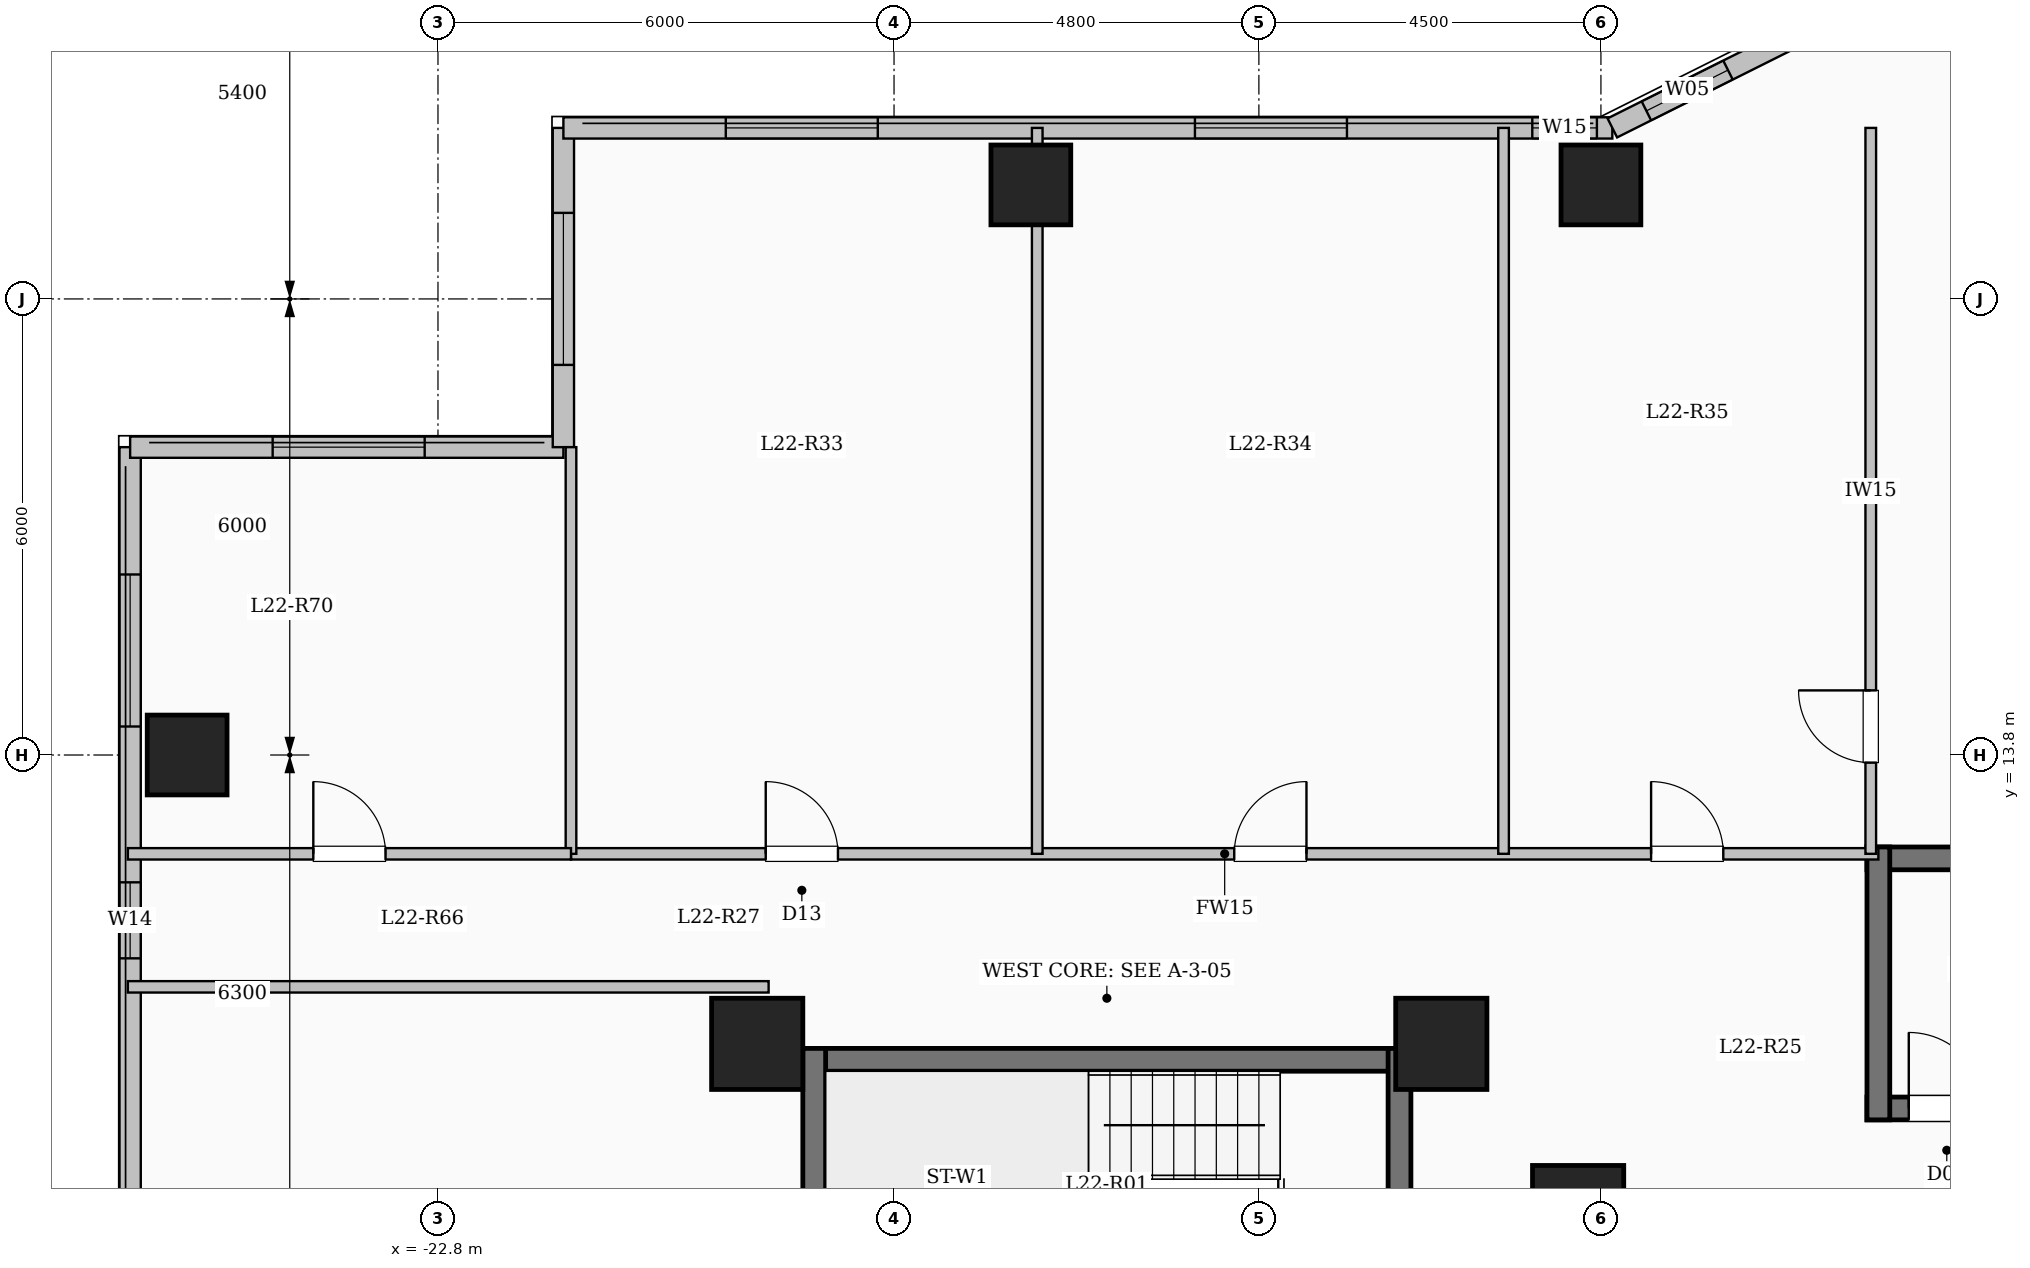
"""IFC4 building model, lengths in metres.
Left out: names, types, materials, properties, quantities, classifications, styles, units other than length and angle.
Written with IfcOpenShell. Run it as: python <this file> out.ifc"""

import sys

from ifc_helpers import new_model, si_unit, direction, frame, frame_2d, origin, origin_2d, place, context, subcontext, project, spatial, rectangle, extrude, element, fill, save


model = new_model("IFC4")
c1 = context("Model", 3, precision=1e-05, world=origin(), true_north=direction((0.0, 1.0)))
c2 = subcontext(c1, "Body", "Model", "MODEL_VIEW")
j1 = project(units=[si_unit("LENGTHUNIT", "METRE"), si_unit("PLANEANGLEUNIT", "RADIAN")], contexts=[c1])
p1 = place(None, origin())
s1 = spatial("IfcSite", under=j1, at=p1, CompositionType="ELEMENT")
p2 = place(p1, origin())
s2 = spatial("IfcBuilding", under=s1, at=p2, CompositionType="ELEMENT")
p3 = place(p2, frame((0.0, 0.0, 85.0)))
s3 = spatial("IfcBuildingStorey", under=s2, at=p3, CompositionType="ELEMENT", Elevation=85.0)
for number, where, z_axis, x_axis in (
    (1, (-7.8, 7.8, 0.0), (0.0, 0.0, 1.0), (1.0, 0.0, 0.0)),
    (2, (-9.6, 10.0, 0.0), (0.0, 0.0, 1.0), (1.0, 0.0, 0.0)),
    (3, (-18.6, 10.0, 0.0), (0.0, 0.0, 1.0), (1.0, 0.0, 0.0)),
):
    element("IfcColumn", number, at=place(p3, frame(where, z_axis=z_axis, x_axis=x_axis)), inside=s3, PredefinedType="COLUMN", context=c2, shape_type="SweptSolid", body=[
        extrude(rectangle(XDim=1.2, YDim=1.2, at=origin_2d()), origin(), (0.0, 0.0, 1.0), 3.35),
    ])
for number, where, z_axis, x_axis in (
    (4, (-15.0, 21.3, 0.0), (0.0, 0.0, 1.0), (1.0, 0.0, 0.0)),
    (5, (-7.5, 21.3, 0.0), (0.0, 0.0, 1.0), (1.0, 0.0, 0.0)),
    (6, (-26.1, 13.8, 0.0), (0.0, 0.0, 1.0), (1.0, 0.0, 0.0)),
):
    element("IfcColumn", number, at=place(p3, frame(where, z_axis=z_axis, x_axis=x_axis)), inside=s3, PredefinedType="COLUMN", context=c2, shape_type="SweptSolid", body=[
        extrude(rectangle(XDim=1.05, YDim=1.05, at=origin_2d()), origin(), (0.0, 0.0, 1.0), 3.35),
    ])
p4 = place(p3, frame((-26.85, -17.85, 0.0), z_axis=(0.0, 0.0, 1.0), x_axis=(0.0, 1.0, 0.0)))
e7 = element("IfcWall", 7, at=p4, inside=s3, PredefinedType="SOLIDWALL", context=c2, shape_type="SweptSolid", body=[
    extrude(rectangle(XDim=35.7, YDim=0.28, at=frame_2d((17.85, 0.0))), origin(), (0.0, 0.0, 1.0), 3.1),
])
p5 = place(p4, frame((2.55, 0.0, 0.9)))
e8 = element("IfcOpeningElement", 8, at=p5, cuts=e7, PredefinedType="OPENING", context=c2, shape_type="SweptSolid", body=[
    extrude(rectangle(XDim=2.4, YDim=1.8, at=frame_2d((1.2, 0.9))), frame((0.0, 0.15, 0.0), z_axis=(0.0, -1.0, 0.0), x_axis=(1.0, 0.0, 0.0)), (0.0, 0.0, 1.0), 0.3),
])
p6 = place(p4, frame((8.343, 0.0, 0.9)))
e9 = element("IfcOpeningElement", 9, at=p6, cuts=e7, PredefinedType="OPENING", context=c2, shape_type="SweptSolid", body=[
    extrude(rectangle(XDim=1.5, YDim=1.65, at=frame_2d((0.75, 0.825))), frame((0.0, 0.15, 0.0), z_axis=(0.0, -1.0, 0.0), x_axis=(1.0, 0.0, 0.0)), (0.0, 0.0, 1.0), 0.3),
])
p7 = place(p4, frame((18.6, 0.0, 0.9)))
e10 = element("IfcOpeningElement", 10, at=p7, cuts=e7, PredefinedType="OPENING", context=c2, shape_type="SweptSolid", body=[
    extrude(rectangle(XDim=2.0, YDim=1.7, at=frame_2d((1.0, 0.85))), frame((0.0, 0.15, 0.0), z_axis=(0.0, -1.0, 0.0), x_axis=(1.0, 0.0, 0.0)), (0.0, 0.0, 1.0), 0.3),
])
p8 = place(p4, frame((28.975, 0.0, 0.95)))
e11 = element("IfcOpeningElement", 11, at=p8, cuts=e7, PredefinedType="OPENING", context=c2, shape_type="SweptSolid", body=[
    extrude(rectangle(XDim=1.0, YDim=1.5, at=frame_2d((0.5, 0.75))), frame((0.0, 0.15, 0.0), z_axis=(0.0, -1.0, 0.0), x_axis=(1.0, 0.0, 0.0)), (0.0, 0.0, 1.0), 0.3),
])
p9 = place(p4, frame((32.025, 0.0, 0.9)))
e12 = element("IfcOpeningElement", 12, at=p9, cuts=e7, PredefinedType="OPENING", context=c2, shape_type="SweptSolid", body=[
    extrude(rectangle(XDim=2.0, YDim=1.7, at=frame_2d((1.0, 0.85))), frame((0.0, 0.15, 0.0), z_axis=(0.0, -1.0, 0.0), x_axis=(1.0, 0.0, 0.0)), (0.0, 0.0, 1.0), 0.3),
])
p10 = place(p3, frame((-26.85, 17.85, 0.0), z_axis=(0.0, 0.0, 1.0), x_axis=(1.0, 0.0, 0.0)))
e13 = element("IfcWall", 13, at=p10, inside=s3, PredefinedType="SOLIDWALL", context=c2, shape_type="SweptSolid", body=[
    extrude(rectangle(XDim=5.7, YDim=0.28, at=frame_2d((2.85, 0.0))), origin(), (0.0, 0.0, 1.0), 3.1),
])
p11 = place(p10, frame((1.875, 0.0, 0.9)))
e14 = element("IfcOpeningElement", 14, at=p11, cuts=e13, PredefinedType="OPENING", context=c2, shape_type="SweptSolid", body=[
    extrude(rectangle(XDim=2.0, YDim=1.7, at=frame_2d((1.0, 0.85))), frame((0.0, 0.15, 0.0), z_axis=(0.0, -1.0, 0.0), x_axis=(1.0, 0.0, 0.0)), (0.0, 0.0, 1.0), 0.3),
])
p12 = place(p3, frame((-21.15, 17.85, 0.0), z_axis=(0.0, 0.0, 1.0), x_axis=(0.0, 1.0, 0.0)))
e15 = element("IfcWall", 15, at=p12, inside=s3, PredefinedType="SOLIDWALL", context=c2, shape_type="SweptSolid", body=[
    extrude(rectangle(XDim=4.2, YDim=0.28, at=frame_2d((2.1, 0.0))), origin(), (0.0, 0.0, 1.0), 3.1),
])
p13 = place(p12, frame((1.082, 0.0, 0.9)))
e16 = element("IfcOpeningElement", 16, at=p13, cuts=e15, PredefinedType="OPENING", context=c2, shape_type="SweptSolid", body=[
    extrude(rectangle(XDim=2.0, YDim=1.7, at=frame_2d((1.0, 0.85))), frame((0.0, 0.15, 0.0), z_axis=(0.0, -1.0, 0.0), x_axis=(1.0, 0.0, 0.0)), (0.0, 0.0, 1.0), 0.3),
])
p14 = place(p3, frame((-21.15, 22.05, 0.0), z_axis=(0.0, 0.0, 1.0), x_axis=(1.0, 0.0, 0.0)))
e17 = element("IfcWall", 17, at=p14, inside=s3, PredefinedType="SOLIDWALL", context=c2, shape_type="SweptSolid", body=[
    extrude(rectangle(XDim=13.8, YDim=0.28, at=frame_2d((6.9, 0.0))), origin(), (0.0, 0.0, 1.0), 3.1),
])
p15 = place(p14, frame((2.136, 0.0, 0.9)))
e18 = element("IfcOpeningElement", 18, at=p15, cuts=e17, PredefinedType="OPENING", context=c2, shape_type="SweptSolid", body=[
    extrude(rectangle(XDim=2.0, YDim=1.7, at=frame_2d((1.0, 0.85))), frame((0.0, 0.15, 0.0), z_axis=(0.0, -1.0, 0.0), x_axis=(1.0, 0.0, 0.0)), (0.0, 0.0, 1.0), 0.3),
])
p16 = place(p14, frame((8.309, 0.0, 0.9)))
e19 = element("IfcOpeningElement", 19, at=p16, cuts=e17, PredefinedType="OPENING", context=c2, shape_type="SweptSolid", body=[
    extrude(rectangle(XDim=2.0, YDim=1.7, at=frame_2d((1.0, 0.85))), frame((0.0, 0.15, 0.0), z_axis=(0.0, -1.0, 0.0), x_axis=(1.0, 0.0, 0.0)), (0.0, 0.0, 1.0), 0.3),
])
p17 = place(p14, frame((12.747, 0.0, 0.95)))
e20 = element("IfcOpeningElement", 20, at=p17, cuts=e17, PredefinedType="OPENING", context=c2, shape_type="SweptSolid", body=[
    extrude(rectangle(XDim=0.85, YDim=1.5, at=frame_2d((0.425, 0.75))), frame((0.0, 0.15, 0.0), z_axis=(0.0, -1.0, 0.0), x_axis=(1.0, 0.0, 0.0)), (0.0, 0.0, 1.0), 0.3),
])
p18 = place(p3, frame((-7.35, 22.05, 0.0), z_axis=(0.0, 0.0, 1.0), x_axis=(0.894427191, 0.4472135955, 0.0)))
e21 = element("IfcWall", 21, at=p18, inside=s3, PredefinedType="SOLIDWALL", context=c2, shape_type="SweptSolid", body=[
    extrude(rectangle(XDim=3.354, YDim=0.28, at=frame_2d((1.677, 0.0))), origin(), (0.0, 0.0, 1.0), 3.1),
])
p19 = place(p18, frame((0.501, 0.0, 0.95)))
e22 = element("IfcOpeningElement", 22, at=p19, cuts=e21, PredefinedType="OPENING", context=c2, shape_type="SweptSolid", body=[
    extrude(rectangle(XDim=1.2, YDim=1.5, at=frame_2d((0.6, 0.75))), frame((0.0, 0.15, 0.0), z_axis=(0.0, -1.0, 0.0), x_axis=(1.0, 0.0, 0.0)), (0.0, 0.0, 1.0), 0.3),
])
p20 = place(p3, frame((-18.0, 9.79, 0.0), z_axis=(0.0, 0.0, 1.0), x_axis=(1.0, 0.0, 0.0)))
e23 = element("IfcWall", 23, at=p20, inside=s3, PredefinedType="SHEAR", context=c2, shape_type="SweptSolid", body=[
    extrude(rectangle(XDim=8.0, YDim=0.3, at=frame_2d((4.0, 0.0))), origin(), (0.0, 0.0, 1.0), 3.35),
])
for number, where, z_axis, x_axis in (
    (24, (-17.85, 6.35, 0.0), (0.0, 0.0, 1.0), (0.0, 1.0, 0.0)),
    (25, (-10.15, 6.35, 0.0), (0.0, 0.0, 1.0), (0.0, 1.0, 0.0)),
):
    element("IfcWall", number, at=place(p3, frame(where, z_axis=z_axis, x_axis=x_axis)), inside=s3, PredefinedType="SHEAR", context=c2, shape_type="SweptSolid", body=[
        extrude(rectangle(XDim=3.59, YDim=0.3, at=frame_2d((1.795, 0.0))), origin(), (0.0, 0.0, 1.0), 3.35),
    ])
p21 = place(p3, frame((-4.0, 12.44, 0.0), z_axis=(0.0, 0.0, 1.0), x_axis=(1.0, 0.0, 0.0)))
e26 = element("IfcWall", 26, at=p21, inside=s3, PredefinedType="SHEAR", context=c2, shape_type="SweptSolid", body=[
    extrude(rectangle(XDim=8.0, YDim=0.3, at=frame_2d((4.0, 0.0))), origin(), (0.0, 0.0, 1.0), 3.35),
])
p22 = place(p3, frame((-4.0, 9.15, 0.0), z_axis=(0.0, 0.0, 1.0), x_axis=(1.0, 0.0, 0.0)))
e27 = element("IfcWall", 27, at=p22, inside=s3, PredefinedType="SHEAR", context=c2, shape_type="SweptSolid", body=[
    extrude(rectangle(XDim=8.0, YDim=0.3, at=frame_2d((4.0, 0.0))), origin(), (0.0, 0.0, 1.0), 3.35),
])
p23 = place(p22, frame((0.55, 0.0, 0.0)))
e28 = element("IfcOpeningElement", 28, at=p23, cuts=e27, PredefinedType="OPENING", context=c2, shape_type="SweptSolid", body=[
    extrude(rectangle(XDim=1.0, YDim=2.15, at=frame_2d((0.5, 1.075))), frame((0.0, 0.16, 0.0), z_axis=(0.0, -1.0, 0.0), x_axis=(1.0, 0.0, 0.0)), (0.0, 0.0, 1.0), 0.32),
])
p24 = place(p3, frame((-3.85, 9.0, 0.0), z_axis=(0.0, 0.0, 1.0), x_axis=(0.0, 1.0, 0.0)))
e29 = element("IfcWall", 29, at=p24, inside=s3, PredefinedType="SHEAR", context=c2, shape_type="SweptSolid", body=[
    extrude(rectangle(XDim=3.59, YDim=0.3, at=frame_2d((1.795, 0.0))), origin(), (0.0, 0.0, 1.0), 3.35),
])
p25 = place(p3, frame((-21.05, 12.5, 0.0), z_axis=(0.0, 0.0, 1.0), x_axis=(1.0, 0.0, 0.0)))
e30 = element("IfcWall", 30, at=p25, inside=s3, PredefinedType="PARTITIONING", context=c2, shape_type="SweptSolid", body=[
    extrude(rectangle(XDim=17.2, YDim=0.15, at=frame_2d((8.6, 0.0))), origin(), (0.0, 0.0, 1.0), 3.1),
])
p26 = place(p25, frame((2.562, 0.0, 0.0)))
e31 = element("IfcOpeningElement", 31, at=p26, cuts=e30, PredefinedType="OPENING", context=c2, shape_type="SweptSolid", body=[
    extrude(rectangle(XDim=0.95, YDim=2.15, at=frame_2d((0.475, 1.075))), frame((0.0, 0.085, 0.0), z_axis=(0.0, -1.0, 0.0), x_axis=(1.0, 0.0, 0.0)), (0.0, 0.0, 1.0), 0.17),
])
p27 = place(p25, frame((8.726, 0.0, 0.0)))
e32 = element("IfcOpeningElement", 32, at=p27, cuts=e30, PredefinedType="OPENING", context=c2, shape_type="SweptSolid", body=[
    extrude(rectangle(XDim=0.95, YDim=2.15, at=frame_2d((0.475, 1.075))), frame((0.0, 0.085, 0.0), z_axis=(0.0, -1.0, 0.0), x_axis=(1.0, 0.0, 0.0)), (0.0, 0.0, 1.0), 0.17),
])
p28 = place(p25, frame((14.21, 0.0, 0.0)))
e33 = element("IfcOpeningElement", 33, at=p28, cuts=e30, PredefinedType="OPENING", context=c2, shape_type="SweptSolid", body=[
    extrude(rectangle(XDim=0.95, YDim=2.15, at=frame_2d((0.475, 1.075))), frame((0.0, 0.085, 0.0), z_axis=(0.0, -1.0, 0.0), x_axis=(1.0, 0.0, 0.0)), (0.0, 0.0, 1.0), 0.17),
])
p29 = place(p3, frame((-3.95, 12.5, 0.0), z_axis=(0.0, 0.0, 1.0), x_axis=(0.0, 1.0, 0.0)))
e34 = element("IfcWall", 34, at=p29, inside=s3, PredefinedType="PARTITIONING", context=c2, shape_type="SweptSolid", body=[
    extrude(rectangle(XDim=9.55, YDim=0.14, at=frame_2d((4.775, 0.0))), origin(), (0.0, 0.0, 1.0), 3.1),
])
p30 = place(p29, frame((1.2, 0.0, 0.0)))
e35 = element("IfcOpeningElement", 35, at=p30, cuts=e34, PredefinedType="OPENING", context=c2, shape_type="SweptSolid", body=[
    extrude(rectangle(XDim=0.95, YDim=2.15, at=frame_2d((0.475, 1.075))), frame((0.0, 0.08, 0.0), z_axis=(0.0, -1.0, 0.0), x_axis=(1.0, 0.0, 0.0)), (0.0, 0.0, 1.0), 0.16),
])
p31 = place(p3, frame((-14.916, 12.5, 0.0), z_axis=(0.0, 0.0, 1.0), x_axis=(0.0, 1.0, 0.0)))
e36 = element("IfcWall", 36, at=p31, inside=s3, PredefinedType="PARTITIONING", context=c2, shape_type="SweptSolid", body=[
    extrude(rectangle(XDim=9.55, YDim=0.14, at=frame_2d((4.775, 0.0))), origin(), (0.0, 0.0, 1.0), 2.435),
])
p32 = place(p3, frame((-8.781, 12.5, 0.0), z_axis=(0.0, 0.0, 1.0), x_axis=(0.0, 1.0, 0.0)))
e37 = element("IfcWall", 37, at=p32, inside=s3, PredefinedType="PARTITIONING", context=c2, shape_type="SweptSolid", body=[
    extrude(rectangle(XDim=9.55, YDim=0.14, at=frame_2d((4.775, 0.0))), origin(), (0.0, 0.0, 1.0), 3.1),
])
p33 = place(p3, frame((-26.88, 10.75, 0.0), z_axis=(0.0, 0.0, 1.0), x_axis=(1.0, 0.0, 0.0)))
e38 = element("IfcWall", 38, at=p33, inside=s3, PredefinedType="PARTITIONING", context=c2, shape_type="SweptSolid", body=[
    extrude(rectangle(XDim=8.43, YDim=0.15, at=frame_2d((4.215, 0.0))), origin(), (0.0, 0.0, 1.0), 3.1),
])
p34 = place(p3, frame((-21.05, 12.5, 0.0), z_axis=(0.0, 0.0, 1.0), x_axis=(0.0, 1.0, 0.0)))
e39 = element("IfcWall", 39, at=p34, inside=s3, PredefinedType="PARTITIONING", context=c2, shape_type="SweptSolid", body=[
    extrude(rectangle(XDim=5.35, YDim=0.14, at=frame_2d((2.675, 0.0))), origin(), (0.0, 0.0, 1.0), 3.1),
])
p35 = place(p3, frame((-26.88, 12.5, 0.0), z_axis=(0.0, 0.0, 1.0), x_axis=(1.0, 0.0, 0.0)))
e40 = element("IfcWall", 40, at=p35, inside=s3, PredefinedType="PARTITIONING", context=c2, shape_type="SweptSolid", body=[
    extrude(rectangle(XDim=5.83, YDim=0.15, at=frame_2d((2.915, 0.0))), origin(), (0.0, 0.0, 1.0), 3.1),
])
p36 = place(p35, frame((2.44, 0.0, 0.0)))
e41 = element("IfcOpeningElement", 41, at=p36, cuts=e40, PredefinedType="OPENING", context=c2, shape_type="SweptSolid", body=[
    extrude(rectangle(XDim=0.95, YDim=2.15, at=frame_2d((0.475, 1.075))), frame((0.0, 0.085, 0.0), z_axis=(0.0, -1.0, 0.0), x_axis=(1.0, 0.0, 0.0)), (0.0, 0.0, 1.0), 0.17),
])
p37 = place(p8, origin())
e42 = element("IfcWindow", 42, at=p37, inside=s3, PartitioningType="SINGLE_PANEL", PredefinedType="WINDOW", context=c2, shape_type="SweptSolid", body=[
    extrude(rectangle(XDim=1.0, YDim=1.5, at=frame_2d((0.5, 0.75))), frame((0.0, 0.03, 0.0), z_axis=(0.0, -1.0, 0.0), x_axis=(1.0, 0.0, 0.0)), (0.0, 0.0, 1.0), 0.06),
])
fill(e11, e42)
p38 = place(p9, origin())
e43 = element("IfcWindow", 43, at=p38, inside=s3, PartitioningType="SINGLE_PANEL", PredefinedType="WINDOW", context=c2, shape_type="SweptSolid", body=[
    extrude(rectangle(XDim=2.0, YDim=1.7, at=frame_2d((1.0, 0.85))), frame((0.0, 0.03, 0.0), z_axis=(0.0, -1.0, 0.0), x_axis=(1.0, 0.0, 0.0)), (0.0, 0.0, 1.0), 0.06),
])
fill(e12, e43)
p39 = place(p11, origin())
e44 = element("IfcWindow", 44, at=p39, inside=s3, PartitioningType="SINGLE_PANEL", PredefinedType="WINDOW", context=c2, shape_type="SweptSolid", body=[
    extrude(rectangle(XDim=2.0, YDim=1.7, at=frame_2d((1.0, 0.85))), frame((0.0, 0.03, 0.0), z_axis=(0.0, -1.0, 0.0), x_axis=(1.0, 0.0, 0.0)), (0.0, 0.0, 1.0), 0.06),
])
fill(e14, e44)
p40 = place(p13, origin())
e45 = element("IfcWindow", 45, at=p40, inside=s3, PartitioningType="SINGLE_PANEL", PredefinedType="WINDOW", context=c2, shape_type="SweptSolid", body=[
    extrude(rectangle(XDim=2.0, YDim=1.7, at=frame_2d((1.0, 0.85))), frame((0.0, 0.03, 0.0), z_axis=(0.0, -1.0, 0.0), x_axis=(1.0, 0.0, 0.0)), (0.0, 0.0, 1.0), 0.06),
])
fill(e16, e45)
p41 = place(p15, origin())
e46 = element("IfcWindow", 46, at=p41, inside=s3, PartitioningType="SINGLE_PANEL", PredefinedType="WINDOW", context=c2, shape_type="SweptSolid", body=[
    extrude(rectangle(XDim=2.0, YDim=1.7, at=frame_2d((1.0, 0.85))), frame((0.0, 0.03, 0.0), z_axis=(0.0, -1.0, 0.0), x_axis=(1.0, 0.0, 0.0)), (0.0, 0.0, 1.0), 0.06),
])
fill(e18, e46)
p42 = place(p16, origin())
e47 = element("IfcWindow", 47, at=p42, inside=s3, PartitioningType="SINGLE_PANEL", PredefinedType="WINDOW", context=c2, shape_type="SweptSolid", body=[
    extrude(rectangle(XDim=2.0, YDim=1.7, at=frame_2d((1.0, 0.85))), frame((0.0, 0.03, 0.0), z_axis=(0.0, -1.0, 0.0), x_axis=(1.0, 0.0, 0.0)), (0.0, 0.0, 1.0), 0.06),
])
fill(e19, e47)
p43 = place(p17, origin())
e48 = element("IfcWindow", 48, at=p43, inside=s3, PartitioningType="SINGLE_PANEL", PredefinedType="WINDOW", context=c2, shape_type="SweptSolid", body=[
    extrude(rectangle(XDim=0.85, YDim=1.5, at=frame_2d((0.425, 0.75))), frame((0.0, 0.03, 0.0), z_axis=(0.0, -1.0, 0.0), x_axis=(1.0, 0.0, 0.0)), (0.0, 0.0, 1.0), 0.06),
])
fill(e20, e48)
p44 = place(p19, origin())
e49 = element("IfcWindow", 49, at=p44, inside=s3, PartitioningType="SINGLE_PANEL", PredefinedType="WINDOW", context=c2, shape_type="SweptSolid", body=[
    extrude(rectangle(XDim=1.2, YDim=1.5, at=frame_2d((0.6, 0.75))), frame((0.0, 0.03, 0.0), z_axis=(0.0, -1.0, 0.0), x_axis=(1.0, 0.0, 0.0)), (0.0, 0.0, 1.0), 0.06),
])
fill(e22, e49)
p45 = place(p23, origin())
e50 = element("IfcDoor", 50, at=p45, inside=s3, OperationType="SINGLE_SWING_LEFT", PredefinedType="DOOR", context=c2, shape_type="SweptSolid", body=[
    extrude(rectangle(XDim=1.0, YDim=2.15, at=frame_2d((0.5, 1.075))), frame((0.0, 0.025, 0.0), z_axis=(0.0, -1.0, 0.0), x_axis=(1.0, 0.0, 0.0)), (0.0, 0.0, 1.0), 0.05),
])
fill(e28, e50)
p46 = place(p26, origin())
e51 = element("IfcDoor", 51, at=p46, inside=s3, OperationType="SINGLE_SWING_LEFT", PredefinedType="DOOR", context=c2, shape_type="SweptSolid", body=[
    extrude(rectangle(XDim=0.95, YDim=2.15, at=frame_2d((0.475, 1.075))), frame((0.0, 0.025, 0.0), z_axis=(0.0, -1.0, 0.0), x_axis=(1.0, 0.0, 0.0)), (0.0, 0.0, 1.0), 0.05),
])
fill(e31, e51)
p47 = place(p27, origin())
e52 = element("IfcDoor", 52, at=p47, inside=s3, OperationType="SINGLE_SWING_RIGHT", PredefinedType="DOOR", context=c2, shape_type="SweptSolid", body=[
    extrude(rectangle(XDim=0.95, YDim=2.15, at=frame_2d((0.475, 1.075))), frame((0.0, 0.025, 0.0), z_axis=(0.0, -1.0, 0.0), x_axis=(1.0, 0.0, 0.0)), (0.0, 0.0, 1.0), 0.05),
])
fill(e32, e52)
p48 = place(p28, origin())
e53 = element("IfcDoor", 53, at=p48, inside=s3, OperationType="SINGLE_SWING_LEFT", PredefinedType="DOOR", context=c2, shape_type="SweptSolid", body=[
    extrude(rectangle(XDim=0.95, YDim=2.15, at=frame_2d((0.475, 1.075))), frame((0.0, 0.025, 0.0), z_axis=(0.0, -1.0, 0.0), x_axis=(1.0, 0.0, 0.0)), (0.0, 0.0, 1.0), 0.05),
])
fill(e33, e53)
p49 = place(p30, origin())
e54 = element("IfcDoor", 54, at=p49, inside=s3, OperationType="SINGLE_SWING_RIGHT", PredefinedType="DOOR", context=c2, shape_type="SweptSolid", body=[
    extrude(rectangle(XDim=0.95, YDim=2.15, at=frame_2d((0.475, 1.075))), frame((0.0, 0.025, 0.0), z_axis=(0.0, -1.0, 0.0), x_axis=(1.0, 0.0, 0.0)), (0.0, 0.0, 1.0), 0.05),
])
fill(e35, e54)
p50 = place(p36, origin())
e55 = element("IfcDoor", 55, at=p50, inside=s3, OperationType="SINGLE_SWING_LEFT", PredefinedType="DOOR", context=c2, shape_type="SweptSolid", body=[
    extrude(rectangle(XDim=0.95, YDim=2.15, at=frame_2d((0.475, 1.075))), frame((0.0, 0.025, 0.0), z_axis=(0.0, -1.0, 0.0), x_axis=(1.0, 0.0, 0.0)), (0.0, 0.0, 1.0), 0.05),
])
fill(e41, e55)
save(model, sys.argv[1])
